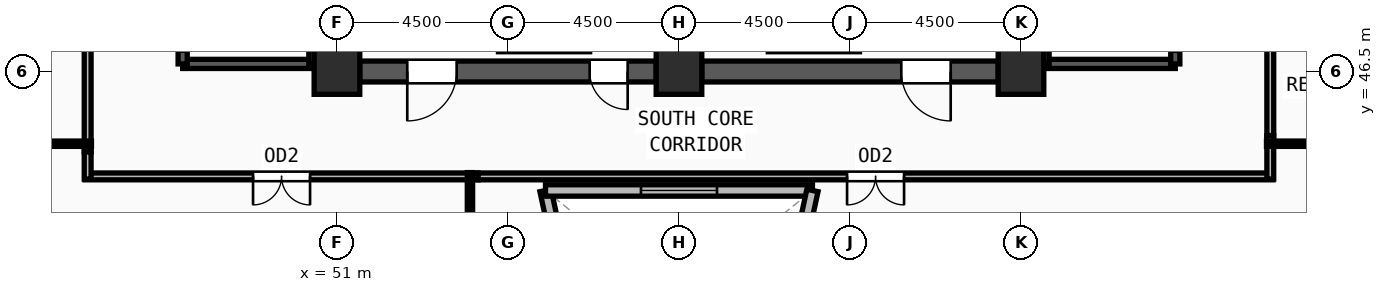
"""IFC4 building model, lengths in metres.
Left out: names, types, materials, properties, quantities, classifications, styles, units other than length and angle.
Written with IfcOpenShell. Run it as: python <this file> out.ifc"""

import sys

from ifc_helpers import new_model, si_unit, direction, frame, frame_2d, origin, origin_2d, place, context, subcontext, project, spatial, rectangle, extrude, source, transform, mapped, element, fill, save


model = new_model("IFC4")
c1 = context("Model", 3, precision=1e-05, world=origin(), true_north=direction((0.0, 1.0)))
c2 = subcontext(c1, "Body", "Model", "MODEL_VIEW")
j1 = project(units=[si_unit("LENGTHUNIT", "METRE"), si_unit("PLANEANGLEUNIT", "RADIAN")], contexts=[c1])
p1 = place(None, origin())
s1 = spatial("IfcSite", under=j1, at=p1, CompositionType="ELEMENT")
p2 = place(p1, origin())
s2 = spatial("IfcBuilding", under=s1, at=p2, CompositionType="ELEMENT")
p3 = place(p2, frame((0.0, 0.0, 286.5)))
s3 = spatial("IfcBuildingStorey", under=s2, at=p3, CompositionType="ELEMENT", Elevation=286.5)
m1 = source(origin(), c2, "Body", "SweptSolid", [
    extrude(rectangle(XDim=1.2, YDim=1.2, at=origin_2d()), origin(), (0.0, 0.0, 1.0), 3.75),
])
for number, where, z_axis, x_axis in (
    (1, (51.0, 46.5, 0.0), (0.0, 0.0, 1.0), (1.0, 0.0, 0.0)),
    (2, (60.0, 46.5, 0.0), (0.0, 0.0, 1.0), (1.0, 0.0, 0.0)),
    (3, (69.0, 46.5, 0.0), (0.0, 0.0, 1.0), (1.0, 0.0, 0.0)),
):
    element("IfcColumn", number, at=place(p3, frame(where, z_axis=z_axis, x_axis=x_axis)), inside=s3, PredefinedType="COLUMN", context=c2, shape_type="MappedRepresentation", body=[
        mapped(m1, transform((0.0, 0.0, 0.0), x_axis=(1.0, 0.0, 0.0), y_axis=(0.0, 1.0, 0.0), z_axis=(0.0, 0.0, 1.0), scale=1.0)),
    ])
p4 = place(p3, frame((39.697, 44.382, 0.0), z_axis=(0.0, 0.0, 1.0), x_axis=(0.556246250685, -0.831017514014, 0.0)))
e4 = element("IfcWall", 4, at=p4, inside=s3, PredefinedType="SOLIDWALL", context=c2, shape_type="SweptSolid", body=[
    extrude(rectangle(XDim=26.986, YDim=0.38, at=frame_2d((13.493, 0.0))), origin(), (0.0, 0.0, 1.0), 3.57),
])
m2 = source(origin(), c2, "Body", "SweptSolid", [
    extrude(rectangle(XDim=1.35, YDim=1.85, at=frame_2d((0.675, 0.925))), frame((0.0, 0.2, 0.0), z_axis=(0.0, -1.0, 0.0), x_axis=(1.0, 0.0, 0.0)), (0.0, 0.0, 1.0), 0.4),
])
p5 = place(p4, frame((6.072, 0.0, 0.55)))
e5 = element("IfcOpeningElement", 5, at=p5, cuts=e4, PredefinedType="OPENING", context=c2, shape_type="MappedRepresentation", body=[
    mapped(m2, transform((0.0, 0.0, 0.0), x_axis=(1.0, 0.0, 0.0), y_axis=(0.0, 1.0, 0.0), z_axis=(0.0, 0.0, 1.0), scale=1.0)),
])
p6 = place(p4, frame((12.818, 0.0, 0.55)))
e6 = element("IfcOpeningElement", 6, at=p6, cuts=e4, PredefinedType="OPENING", context=c2, shape_type="MappedRepresentation", body=[
    mapped(m2, transform((0.0, 0.0, 0.0), x_axis=(1.0, 0.0, 0.0), y_axis=(0.0, 1.0, 0.0), z_axis=(0.0, 0.0, 1.0), scale=1.0)),
])
p7 = place(p4, frame((19.565, 0.0, 0.55)))
e7 = element("IfcOpeningElement", 7, at=p7, cuts=e4, PredefinedType="OPENING", context=c2, shape_type="MappedRepresentation", body=[
    mapped(m2, transform((0.0, 0.0, 0.0), x_axis=(1.0, 0.0, 0.0), y_axis=(0.0, 1.0, 0.0), z_axis=(0.0, 0.0, 1.0), scale=1.0)),
])
p8 = place(p3, frame((68.4, 46.5, 0.0), z_axis=(0.0, 0.0, 1.0), x_axis=(-1.0, 0.0, 0.0)))
e8 = element("IfcWall", 8, at=p8, inside=s3, PredefinedType="SHEAR", context=c2, shape_type="SweptSolid", body=[
    extrude(rectangle(XDim=7.8, YDim=0.55, at=frame_2d((3.9, 0.0))), origin(), (0.0, 0.0, 1.0), 3.57),
])
m3 = source(origin(), c2, "Body", "SweptSolid", [
    extrude(rectangle(XDim=1.3, YDim=2.2, at=frame_2d((0.65, 1.1))), frame((0.0, 0.285, 0.0), z_axis=(0.0, -1.0, 0.0), x_axis=(1.0, 0.0, 0.0)), (0.0, 0.0, 1.0), 0.57),
])
p9 = place(p8, frame((1.25, 0.0, 0.0)))
e9 = element("IfcOpeningElement", 9, at=p9, cuts=e8, PredefinedType="OPENING", context=c2, shape_type="MappedRepresentation", body=[
    mapped(m3, transform((0.0, 0.0, 0.0), x_axis=(1.0, 0.0, 0.0), y_axis=(0.0, 1.0, 0.0), z_axis=(0.0, 0.0, 1.0), scale=1.0)),
])
p10 = place(p3, frame((59.4, 46.5, 0.0), z_axis=(0.0, 0.0, 1.0), x_axis=(-1.0, 0.0, 0.0)))
e10 = element("IfcWall", 10, at=p10, inside=s3, PredefinedType="SHEAR", context=c2, shape_type="SweptSolid", body=[
    extrude(rectangle(XDim=7.8, YDim=0.55, at=frame_2d((3.9, 0.0))), origin(), (0.0, 0.0, 1.0), 3.57),
])
p11 = place(p10, frame((5.25, 0.0, 0.0)))
e11 = element("IfcOpeningElement", 11, at=p11, cuts=e10, PredefinedType="OPENING", context=c2, shape_type="MappedRepresentation", body=[
    mapped(m3, transform((0.0, 0.0, 0.0), x_axis=(1.0, 0.0, 0.0), y_axis=(0.0, 1.0, 0.0), z_axis=(0.0, 0.0, 1.0), scale=1.0)),
])
m4 = source(origin(), c2, "Body", "SweptSolid", [
    extrude(rectangle(XDim=1.0, YDim=2.2, at=frame_2d((0.5, 1.1))), frame((0.0, 0.285, 0.0), z_axis=(0.0, -1.0, 0.0), x_axis=(1.0, 0.0, 0.0)), (0.0, 0.0, 1.0), 0.57),
])
p12 = place(p10, frame((0.75, 0.0, 0.0)))
e12 = element("IfcOpeningElement", 12, at=p12, cuts=e10, PredefinedType="OPENING", context=c2, shape_type="MappedRepresentation", body=[
    mapped(m4, transform((0.0, 0.0, 0.0), x_axis=(1.0, 0.0, 0.0), y_axis=(0.0, 1.0, 0.0), z_axis=(0.0, 0.0, 1.0), scale=1.0)),
])
p13 = place(p3, frame((46.94, 46.7, 0.0), z_axis=(0.0, 0.0, 1.0), x_axis=(1.0, 0.0, 0.0)))
e13 = element("IfcWall", 13, at=p13, inside=s3, PredefinedType="SOLIDWALL", context=c2, shape_type="SweptSolid", body=[
    extrude(rectangle(XDim=3.44, YDim=0.24, at=frame_2d((1.72, 0.0))), origin(), (0.0, 0.0, 1.0), 3.57),
])
p14 = place(p3, frame((50.38, 46.7, 0.0), z_axis=(0.0, 0.0, 1.0), x_axis=(0.0, 1.0, 0.0)))
e14 = element("IfcWall", 14, at=p14, inside=s3, PredefinedType="SOLIDWALL", context=c2, shape_type="SweptSolid", body=[
    extrude(rectangle(XDim=7.82, YDim=0.24, at=frame_2d((3.91, 0.0))), origin(), (0.0, 0.0, 1.0), 3.57),
])
p15 = place(p3, frame((46.94, 54.52, 0.0), z_axis=(0.0, 0.0, 1.0), x_axis=(0.0, -1.0, 0.0)))
e15 = element("IfcWall", 15, at=p15, inside=s3, PredefinedType="SOLIDWALL", context=c2, shape_type="SweptSolid", body=[
    extrude(rectangle(XDim=7.82, YDim=0.24, at=frame_2d((3.91, 0.0))), origin(), (0.0, 0.0, 1.0), 3.57),
])
m5 = source(origin(), c2, "Body", "SweptSolid", [
    extrude(rectangle(XDim=1.2, YDim=2.2, at=frame_2d((0.6, 1.1))), frame((0.0, 0.13, 0.0), z_axis=(0.0, -1.0, 0.0), x_axis=(1.0, 0.0, 0.0)), (0.0, 0.0, 1.0), 0.26),
])
p16 = place(p15, frame((6.3, 0.0, 0.0)))
e16 = element("IfcOpeningElement", 16, at=p16, cuts=e15, PredefinedType="OPENING", context=c2, shape_type="MappedRepresentation", body=[
    mapped(m5, transform((0.0, 0.0, 0.0), x_axis=(1.0, 0.0, 0.0), y_axis=(0.0, 1.0, 0.0), z_axis=(0.0, 0.0, 1.0), scale=1.0)),
])
p17 = place(p3, frame((69.62, 46.7, 0.0), z_axis=(0.0, 0.0, 1.0), x_axis=(1.0, 0.0, 0.0)))
e17 = element("IfcWall", 17, at=p17, inside=s3, PredefinedType="SOLIDWALL", context=c2, shape_type="SweptSolid", body=[
    extrude(rectangle(XDim=3.44, YDim=0.24, at=frame_2d((1.72, 0.0))), origin(), (0.0, 0.0, 1.0), 3.57),
])
p18 = place(p3, frame((73.06, 46.7, 0.0), z_axis=(0.0, 0.0, 1.0), x_axis=(0.0, 1.0, 0.0)))
e18 = element("IfcWall", 18, at=p18, inside=s3, PredefinedType="SOLIDWALL", context=c2, shape_type="SweptSolid", body=[
    extrude(rectangle(XDim=7.82, YDim=0.24, at=frame_2d((3.91, 0.0))), origin(), (0.0, 0.0, 1.0), 3.57),
])
p19 = place(p18, frame((0.32, 0.0, 0.0)))
e19 = element("IfcOpeningElement", 19, at=p19, cuts=e18, PredefinedType="OPENING", context=c2, shape_type="MappedRepresentation", body=[
    mapped(m5, transform((0.0, 0.0, 0.0), x_axis=(1.0, 0.0, 0.0), y_axis=(0.0, 1.0, 0.0), z_axis=(0.0, 0.0, 1.0), scale=1.0)),
])
p20 = place(p3, frame((69.62, 54.52, 0.0), z_axis=(0.0, 0.0, 1.0), x_axis=(0.0, -1.0, 0.0)))
e20 = element("IfcWall", 20, at=p20, inside=s3, PredefinedType="SOLIDWALL", context=c2, shape_type="SweptSolid", body=[
    extrude(rectangle(XDim=7.82, YDim=0.24, at=frame_2d((3.91, 0.0))), origin(), (0.0, 0.0, 1.0), 3.57),
])
p21 = place(p3, frame((57.717, 37.685, 0.0), z_axis=(0.0, 0.0, 1.0), x_axis=(-0.211300278916, 0.977421194844, 0.0)))
e21 = element("IfcWall", 21, at=p21, inside=s3, PredefinedType="SOLIDWALL", context=c2, shape_type="SweptSolid", body=[
    extrude(rectangle(XDim=5.816, YDim=0.3, at=frame_2d((2.908, 0.0))), origin(), (0.0, 0.0, 1.0), 3.57),
])
m6 = source(origin(), c2, "Body", "SweptSolid", [
    extrude(rectangle(XDim=2.0, YDim=1.9, at=frame_2d((1.0, 0.95))), frame((0.0, 0.16, 0.0), z_axis=(0.0, -1.0, 0.0), x_axis=(1.0, 0.0, 0.0)), (0.0, 0.0, 1.0), 0.32),
])
p22 = place(p21, frame((1.908, 0.0, 0.55)))
e22 = element("IfcOpeningElement", 22, at=p22, cuts=e21, PredefinedType="OPENING", context=c2, shape_type="MappedRepresentation", body=[
    mapped(m6, transform((0.0, 0.0, 0.0), x_axis=(1.0, 0.0, 0.0), y_axis=(0.0, 1.0, 0.0), z_axis=(0.0, 0.0, 1.0), scale=1.0)),
])
p23 = place(p3, frame((56.488, 43.37, 0.0), z_axis=(0.0, 0.0, 1.0), x_axis=(1.0, 0.0, 0.0)))
e23 = element("IfcWall", 23, at=p23, inside=s3, PredefinedType="SOLIDWALL", context=c2, shape_type="SweptSolid", body=[
    extrude(rectangle(XDim=7.024, YDim=0.3, at=frame_2d((3.512, 0.0))), origin(), (0.0, 0.0, 1.0), 3.57),
])
p24 = place(p23, frame((2.512, 0.0, 0.55)))
e24 = element("IfcOpeningElement", 24, at=p24, cuts=e23, PredefinedType="OPENING", context=c2, shape_type="MappedRepresentation", body=[
    mapped(m6, transform((0.0, 0.0, 0.0), x_axis=(1.0, 0.0, 0.0), y_axis=(0.0, 1.0, 0.0), z_axis=(0.0, 0.0, 1.0), scale=1.0)),
])
p25 = place(p3, frame((63.512, 43.37, 0.0), z_axis=(0.0, 0.0, 1.0), x_axis=(-0.211300278916, -0.977421194844, 0.0)))
e25 = element("IfcWall", 25, at=p25, inside=s3, PredefinedType="SOLIDWALL", context=c2, shape_type="SweptSolid", body=[
    extrude(rectangle(XDim=5.816, YDim=0.3, at=frame_2d((2.908, 0.0))), origin(), (0.0, 0.0, 1.0), 3.57),
])
p26 = place(p25, frame((1.908, 0.0, 0.55)))
e26 = element("IfcOpeningElement", 26, at=p26, cuts=e25, PredefinedType="OPENING", context=c2, shape_type="MappedRepresentation", body=[
    mapped(m6, transform((0.0, 0.0, 0.0), x_axis=(1.0, 0.0, 0.0), y_axis=(0.0, 1.0, 0.0), z_axis=(0.0, 0.0, 1.0), scale=1.0)),
])
p27 = place(p3, frame((44.44, 44.385, 0.0), z_axis=(0.0, 0.0, 1.0), x_axis=(0.0, 1.0, 0.0)))
e27 = element("IfcWall", 27, at=p27, inside=s3, PredefinedType="PARTITIONING", context=c2, shape_type="SweptSolid", body=[
    extrude(rectangle(XDim=7.9, YDim=0.18, at=frame_2d((3.95, 0.0))), origin(), (0.0, 0.0, 1.0), 3.57),
])
m7 = source(origin(), c2, "Body", "SweptSolid", [
    extrude(rectangle(XDim=1.0, YDim=2.2, at=frame_2d((0.5, 1.1))), frame((0.0, 0.1, 0.0), z_axis=(0.0, -1.0, 0.0), x_axis=(1.0, 0.0, 0.0)), (0.0, 0.0, 1.0), 0.2),
])
p28 = place(p27, frame((3.45, 0.0, 0.0)))
e28 = element("IfcOpeningElement", 28, at=p28, cuts=e27, PredefinedType="OPENING", context=c2, shape_type="MappedRepresentation", body=[
    mapped(m7, transform((0.0, 0.0, 0.0), x_axis=(1.0, 0.0, 0.0), y_axis=(0.0, 1.0, 0.0), z_axis=(0.0, 0.0, 1.0), scale=1.0)),
])
p29 = place(p3, frame((54.715, 43.74, 0.0), z_axis=(0.0, 0.0, 1.0), x_axis=(-1.0, 0.0, 0.0)))
e29 = element("IfcWall", 29, at=p29, inside=s3, PredefinedType="PARTITIONING", context=c2, shape_type="SweptSolid", body=[
    extrude(rectangle(XDim=10.345, YDim=0.18, at=frame_2d((5.172, 0.0))), origin(), (0.0, 0.0, 1.0), 3.57),
])
m8 = source(origin(), c2, "Body", "SweptSolid", [
    extrude(rectangle(XDim=1.5, YDim=2.2, at=frame_2d((0.75, 1.1))), frame((0.0, 0.1, 0.0), z_axis=(0.0, -1.0, 0.0), x_axis=(1.0, 0.0, 0.0)), (0.0, 0.0, 1.0), 0.2),
])
p30 = place(p29, frame((4.423, 0.0, 0.0)))
e30 = element("IfcOpeningElement", 30, at=p30, cuts=e29, PredefinedType="OPENING", context=c2, shape_type="MappedRepresentation", body=[
    mapped(m8, transform((0.0, 0.0, 0.0), x_axis=(1.0, 0.0, 0.0), y_axis=(0.0, 1.0, 0.0), z_axis=(0.0, 0.0, 1.0), scale=1.0)),
])
p31 = place(p3, frame((75.63, 43.74, 0.0), z_axis=(0.0, 0.0, 1.0), x_axis=(-1.0, 0.0, 0.0)))
e31 = element("IfcWall", 31, at=p31, inside=s3, PredefinedType="PARTITIONING", context=c2, shape_type="SweptSolid", body=[
    extrude(rectangle(XDim=20.915, YDim=0.18, at=frame_2d((10.458, 0.0))), origin(), (0.0, 0.0, 1.0), 3.57),
])
p32 = place(p31, frame((9.707, 0.0, 0.0)))
e32 = element("IfcOpeningElement", 32, at=p32, cuts=e31, PredefinedType="OPENING", context=c2, shape_type="MappedRepresentation", body=[
    mapped(m8, transform((0.0, 0.0, 0.0), x_axis=(1.0, 0.0, 0.0), y_axis=(0.0, 1.0, 0.0), z_axis=(0.0, 0.0, 1.0), scale=1.0)),
])
p33 = place(p3, frame((44.44, 43.67, 0.0), z_axis=(0.0, 0.0, 1.0), x_axis=(0.0, 1.0, 0.0)))
e33 = element("IfcWall", 33, at=p33, inside=s3, PredefinedType="PARTITIONING", context=c2, shape_type="SweptSolid", body=[
    extrude(rectangle(XDim=0.715, YDim=0.18, at=frame_2d((0.357, 0.0))), origin(), (0.0, 0.0, 1.0), 3.57),
])
p34 = place(p3, frame((75.56, 44.815, 0.0), z_axis=(0.0, 0.0, 1.0), x_axis=(0.0, -1.0, 0.0)))
e34 = element("IfcWall", 34, at=p34, inside=s3, PredefinedType="PARTITIONING", context=c2, shape_type="SweptSolid", body=[
    extrude(rectangle(XDim=1.145, YDim=0.18, at=frame_2d((0.573, 0.0))), origin(), (0.0, 0.0, 1.0), 3.57),
])
p35 = place(p3, frame((75.56, 48.21, 0.0), z_axis=(0.0, 0.0, 1.0), x_axis=(0.0, -1.0, 0.0)))
e35 = element("IfcWall", 35, at=p35, inside=s3, PredefinedType="PARTITIONING", context=c2, shape_type="SweptSolid", body=[
    extrude(rectangle(XDim=3.395, YDim=0.18, at=frame_2d((1.698, 0.0))), origin(), (0.0, 0.0, 1.0), 3.57),
])
p36 = place(p3, frame((44.54, 44.6, 0.0), z_axis=(0.0, 0.0, 1.0), x_axis=(-1.0, 0.0, 0.0)))
e36 = element("IfcWall", 36, at=p36, inside=s3, PredefinedType="PARTITIONING", context=c2, shape_type="SweptSolid", body=[
    extrude(rectangle(XDim=5.731, YDim=0.14, at=frame_2d((2.865, 0.0))), origin(), (0.0, 0.0, 1.0), 3.57),
])
p37 = place(p3, frame((75.46, 44.6, 0.0), z_axis=(0.0, 0.0, 1.0), x_axis=(1.0, 0.0, 0.0)))
e37 = element("IfcWall", 37, at=p37, inside=s3, PredefinedType="PARTITIONING", context=c2, shape_type="SweptSolid", body=[
    extrude(rectangle(XDim=5.383, YDim=0.14, at=frame_2d((2.691, 0.0))), origin(), (0.0, 0.0, 1.0), 3.57),
])
p38 = place(p3, frame((54.5, 43.84, 0.0), z_axis=(0.0, 0.0, 1.0), x_axis=(0.0, -1.0, 0.0)))
e38 = element("IfcWall", 38, at=p38, inside=s3, PredefinedType="PARTITIONING", context=c2, shape_type="SweptSolid", body=[
    extrude(rectangle(XDim=22.707, YDim=0.14, at=frame_2d((11.354, 0.0))), origin(), (0.0, 0.0, 1.0), 2.967),
])
m9 = source(origin(), c2, "Body", "SweptSolid", [
    extrude(rectangle(XDim=1.3, YDim=2.2, at=frame_2d((0.65, 1.1))), frame((0.0, 0.025, 0.0), z_axis=(0.0, -1.0, 0.0), x_axis=(1.0, 0.0, 0.0)), (0.0, 0.0, 1.0), 0.05),
])
p39 = place(p11, origin())
e39 = element("IfcDoor", 39, at=p39, inside=s3, OperationType="SINGLE_SWING_RIGHT", PredefinedType="DOOR", context=c2, shape_type="MappedRepresentation", body=[
    mapped(m9, transform((0.0, 0.0, 0.0), x_axis=(1.0, 0.0, 0.0), y_axis=(0.0, 1.0, 0.0), z_axis=(0.0, 0.0, 1.0), scale=1.0)),
])
fill(e11, e39)
m10 = source(origin(), c2, "Body", "SweptSolid", [
    extrude(rectangle(XDim=1.0, YDim=2.2, at=frame_2d((0.5, 1.1))), frame((0.0, 0.025, 0.0), z_axis=(0.0, -1.0, 0.0), x_axis=(1.0, 0.0, 0.0)), (0.0, 0.0, 1.0), 0.05),
])
p40 = place(p12, origin())
e40 = element("IfcDoor", 40, at=p40, inside=s3, OperationType="SINGLE_SWING_LEFT", PredefinedType="DOOR", context=c2, shape_type="MappedRepresentation", body=[
    mapped(m10, transform((0.0, 0.0, 0.0), x_axis=(1.0, 0.0, 0.0), y_axis=(0.0, 1.0, 0.0), z_axis=(0.0, 0.0, 1.0), scale=1.0)),
])
fill(e12, e40)
p41 = place(p9, origin())
e41 = element("IfcDoor", 41, at=p41, inside=s3, OperationType="SINGLE_SWING_LEFT", PredefinedType="DOOR", context=c2, shape_type="MappedRepresentation", body=[
    mapped(m9, transform((0.0, 0.0, 0.0), x_axis=(1.0, 0.0, 0.0), y_axis=(0.0, 1.0, 0.0), z_axis=(0.0, 0.0, 1.0), scale=1.0)),
])
fill(e9, e41)
m11 = source(origin(), c2, "Body", "SweptSolid", [
    extrude(rectangle(XDim=2.0, YDim=1.9, at=frame_2d((1.0, 0.95))), frame((0.0, 0.03, 0.0), z_axis=(0.0, -1.0, 0.0), x_axis=(1.0, 0.0, 0.0)), (0.0, 0.0, 1.0), 0.06),
])
p42 = place(p24, origin())
e42 = element("IfcWindow", 42, at=p42, inside=s3, PartitioningType="DOUBLE_PANEL_VERTICAL", PredefinedType="WINDOW", context=c2, shape_type="MappedRepresentation", body=[
    mapped(m11, transform((0.0, 0.0, 0.0), x_axis=(1.0, 0.0, 0.0), y_axis=(0.0, 1.0, 0.0), z_axis=(0.0, 0.0, 1.0), scale=1.0)),
])
fill(e24, e42)
m12 = source(origin(), c2, "Body", "SweptSolid", [
    extrude(rectangle(XDim=1.5, YDim=2.2, at=frame_2d((0.75, 1.1))), frame((0.0, 0.025, 0.0), z_axis=(0.0, -1.0, 0.0), x_axis=(1.0, 0.0, 0.0)), (0.0, 0.0, 1.0), 0.05),
])
p43 = place(p30, origin())
e43 = element("IfcDoor", 43, at=p43, inside=s3, OperationType="DOUBLE_DOOR_SINGLE_SWING", PredefinedType="DOOR", context=c2, shape_type="MappedRepresentation", body=[
    mapped(m12, transform((0.0, 0.0, 0.0), x_axis=(1.0, 0.0, 0.0), y_axis=(0.0, 1.0, 0.0), z_axis=(0.0, 0.0, 1.0), scale=1.0)),
])
fill(e30, e43)
p44 = place(p32, origin())
e44 = element("IfcDoor", 44, at=p44, inside=s3, OperationType="DOUBLE_DOOR_SINGLE_SWING", PredefinedType="DOOR", context=c2, shape_type="MappedRepresentation", body=[
    mapped(m12, transform((0.0, 0.0, 0.0), x_axis=(1.0, 0.0, 0.0), y_axis=(0.0, 1.0, 0.0), z_axis=(0.0, 0.0, 1.0), scale=1.0)),
])
fill(e32, e44)
save(model, sys.argv[1])
